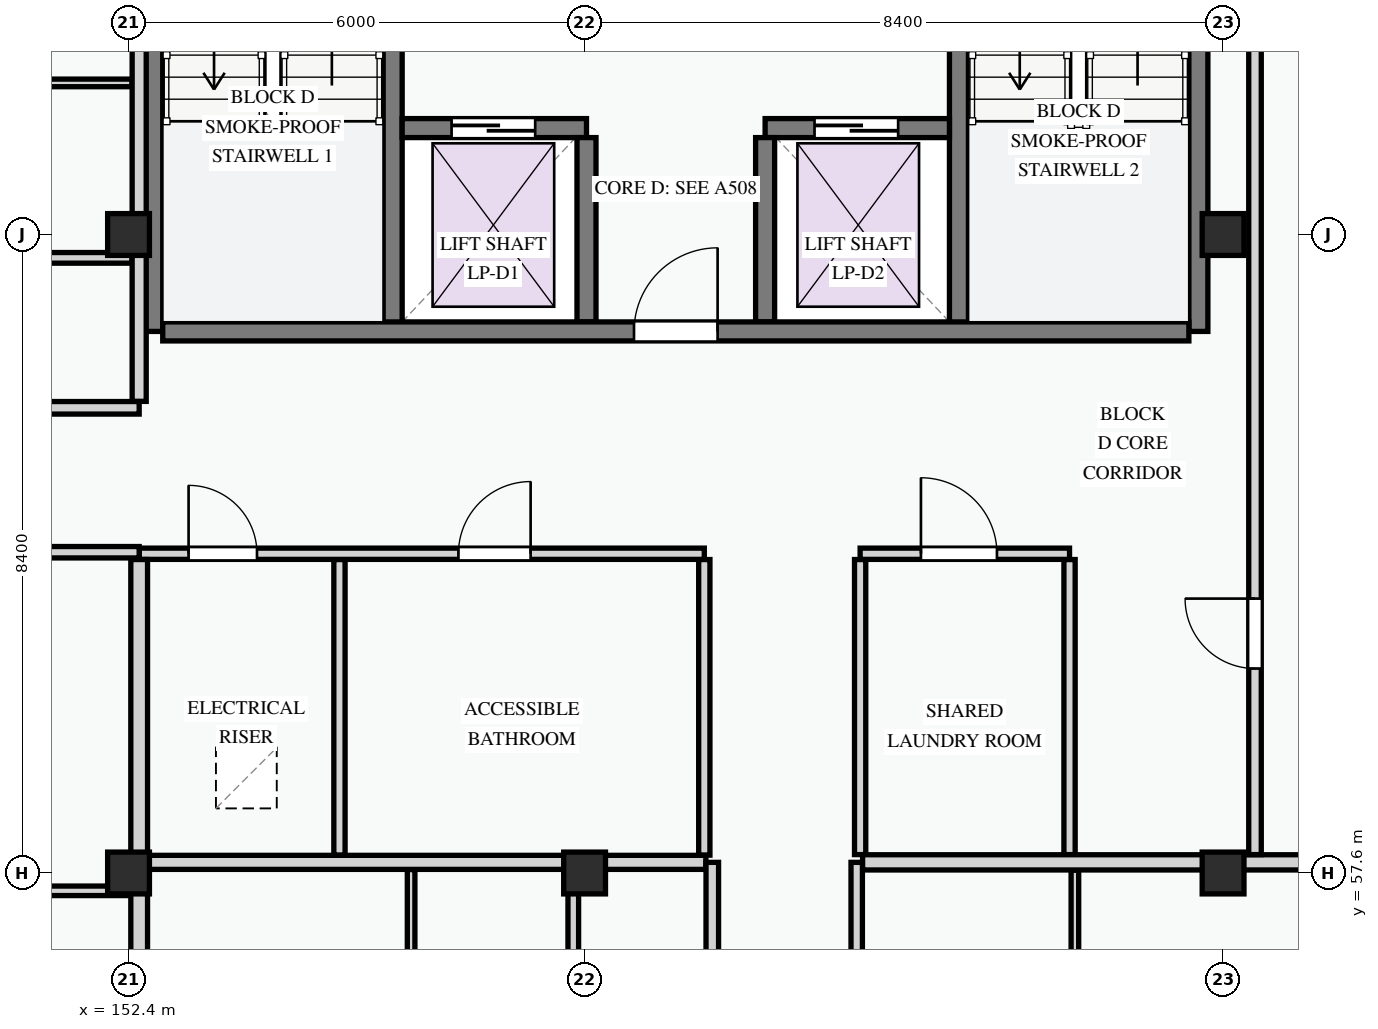
"""IFC4 building model, lengths in metres.
Left out: names, types, materials, properties, quantities, classifications, styles, units other than length and angle.
Written with IfcOpenShell. Run it as: python <this file> out.ifc"""

import sys

from ifc_helpers import new_model, si_unit, direction, frame, frame_2d, origin, origin_2d, place, context, subcontext, project, spatial, rectangle, extrude, element, fill, save


model = new_model("IFC4")
c1 = context("Model", 3, precision=1e-05, world=origin(), true_north=direction((0.0, 1.0)))
c2 = subcontext(c1, "Body", "Model", "MODEL_VIEW")
j1 = project(units=[si_unit("LENGTHUNIT", "METRE"), si_unit("PLANEANGLEUNIT", "RADIAN")], contexts=[c1])
p1 = place(None, origin())
s1 = spatial("IfcSite", under=j1, at=p1, CompositionType="ELEMENT")
p2 = place(p1, origin())
s2 = spatial("IfcBuilding", under=s1, at=p2, CompositionType="ELEMENT")
p3 = place(p2, frame((0.0, 0.0, 11.4)))
s3 = spatial("IfcBuildingStorey", under=s2, at=p3, CompositionType="ELEMENT", Elevation=11.4)
for number, where, z_axis, x_axis in (
    (1, (152.4, 57.6, 0.0), (0.0, 0.0, 1.0), (1.0, 0.0, 0.0)),
    (2, (152.4, 66.0, 0.0), (0.0, 0.0, 1.0), (1.0, 0.0, 0.0)),
    (3, (158.4, 57.6, 0.0), (0.0, 0.0, 1.0), (1.0, 0.0, 0.0)),
    (4, (166.8, 57.6, 0.0), (0.0, 0.0, 1.0), (1.0, 0.0, 0.0)),
    (5, (166.8, 66.0, 0.0), (0.0, 0.0, 1.0), (1.0, 0.0, 0.0)),
):
    element("IfcColumn", number, at=place(p3, frame(where, z_axis=z_axis, x_axis=x_axis)), inside=s3, PredefinedType="COLUMN", context=c2, shape_type="SweptSolid", body=[
        extrude(rectangle(XDim=0.55, YDim=0.55, at=origin_2d()), origin(), (0.0, 0.0, 1.0), 3.3),
    ])
p4 = place(p3, frame((155.875, 71.65, 0.0), z_axis=(0.0, 0.0, 1.0), x_axis=(0.0, -1.0, 0.0)))
e6 = element("IfcWall", 6, at=p4, inside=s3, PredefinedType="SHEAR", context=c2, shape_type="SweptSolid", body=[
    extrude(rectangle(XDim=6.925, YDim=0.25, at=frame_2d((3.462, 0.0))), origin(), (0.0, 0.0, 1.0), 3.0),
])
p5 = place(p4, frame((0.35, 0.0, 0.0)))
e7 = element("IfcOpeningElement", 7, at=p5, cuts=e6, PredefinedType="OPENING", context=c2, shape_type="SweptSolid", body=[
    extrude(rectangle(XDim=0.95, YDim=2.1, at=frame_2d((0.475, 1.05))), frame((0.0, 0.135, 0.0), z_axis=(0.0, -1.0, 0.0), x_axis=(1.0, 0.0, 0.0)), (0.0, 0.0, 1.0), 0.27),
])
p6 = place(p3, frame((152.725, 71.8, 0.0), z_axis=(0.0, 0.0, 1.0), x_axis=(0.0, -1.0, 0.0)))
e8 = element("IfcWall", 8, at=p6, inside=s3, PredefinedType="SHEAR", context=c2, shape_type="SweptSolid", body=[
    extrude(rectangle(XDim=7.075, YDim=0.25, at=frame_2d((3.538, 0.0))), origin(), (0.0, 0.0, 1.0), 3.0),
])
p7 = place(p3, frame((166.475, 71.65, 0.0), z_axis=(0.0, 0.0, 1.0), x_axis=(0.0, -1.0, 0.0)))
e9 = element("IfcWall", 9, at=p7, inside=s3, PredefinedType="SHEAR", context=c2, shape_type="SweptSolid", body=[
    extrude(rectangle(XDim=6.925, YDim=0.25, at=frame_2d((3.462, 0.0))), origin(), (0.0, 0.0, 1.0), 3.0),
])
p8 = place(p3, frame((163.325, 71.65, 0.0), z_axis=(0.0, 0.0, 1.0), x_axis=(0.0, -1.0, 0.0)))
e10 = element("IfcWall", 10, at=p8, inside=s3, PredefinedType="SHEAR", context=c2, shape_type="SweptSolid", body=[
    extrude(rectangle(XDim=6.925, YDim=0.25, at=frame_2d((3.462, 0.0))), origin(), (0.0, 0.0, 1.0), 3.0),
])
p9 = place(p8, frame((0.35, 0.0, 0.0)))
e11 = element("IfcOpeningElement", 11, at=p9, cuts=e10, PredefinedType="OPENING", context=c2, shape_type="SweptSolid", body=[
    extrude(rectangle(XDim=0.95, YDim=2.1, at=frame_2d((0.475, 1.05))), frame((0.0, 0.135, 0.0), z_axis=(0.0, -1.0, 0.0), x_axis=(1.0, 0.0, 0.0)), (0.0, 0.0, 1.0), 0.27),
])
p10 = place(p3, frame((156.0, 67.4, 0.0), z_axis=(0.0, 0.0, 1.0), x_axis=(1.0, 0.0, 0.0)))
e12 = element("IfcWall", 12, at=p10, inside=s3, PredefinedType="SHEAR", context=c2, shape_type="SweptSolid", body=[
    extrude(rectangle(XDim=2.425, YDim=0.25, at=frame_2d((1.212, 0.0))), origin(), (0.0, 0.0, 1.0), 3.0),
])
p11 = place(p10, frame((0.65, 0.0, 0.0)))
e13 = element("IfcOpeningElement", 13, at=p11, cuts=e12, PredefinedType="OPENING", context=c2, shape_type="SweptSolid", body=[
    extrude(rectangle(XDim=1.1, YDim=2.15, at=frame_2d((0.55, 1.075))), frame((0.0, 0.135, 0.0), z_axis=(0.0, -1.0, 0.0), x_axis=(1.0, 0.0, 0.0)), (0.0, 0.0, 1.0), 0.27),
])
p12 = place(p3, frame((160.775, 67.4, 0.0), z_axis=(0.0, 0.0, 1.0), x_axis=(1.0, 0.0, 0.0)))
e14 = element("IfcWall", 14, at=p12, inside=s3, PredefinedType="SHEAR", context=c2, shape_type="SweptSolid", body=[
    extrude(rectangle(XDim=2.425, YDim=0.25, at=frame_2d((1.212, 0.0))), origin(), (0.0, 0.0, 1.0), 3.0),
])
p13 = place(p12, frame((0.65, 0.0, 0.0)))
e15 = element("IfcOpeningElement", 15, at=p13, cuts=e14, PredefinedType="OPENING", context=c2, shape_type="SweptSolid", body=[
    extrude(rectangle(XDim=1.1, YDim=2.15, at=frame_2d((0.55, 1.075))), frame((0.0, 0.135, 0.0), z_axis=(0.0, -1.0, 0.0), x_axis=(1.0, 0.0, 0.0)), (0.0, 0.0, 1.0), 0.27),
])
for number, where, z_axis, x_axis in (
    (16, (158.425, 67.275, 0.0), (0.0, 0.0, 1.0), (0.0, -1.0, 0.0)),
    (17, (160.775, 67.275, 0.0), (0.0, 0.0, 1.0), (0.0, -1.0, 0.0)),
):
    element("IfcWall", number, at=place(p3, frame(where, z_axis=z_axis, x_axis=x_axis)), inside=s3, PredefinedType="SHEAR", context=c2, shape_type="SweptSolid", body=[
        extrude(rectangle(XDim=2.425, YDim=0.25, at=frame_2d((1.212, 0.0))), origin(), (0.0, 0.0, 1.0), 3.0),
    ])
p14 = place(p3, frame((152.85, 64.725, 0.0), z_axis=(0.0, 0.0, 1.0), x_axis=(1.0, 0.0, 0.0)))
e18 = element("IfcWall", 18, at=p14, inside=s3, PredefinedType="SHEAR", context=c2, shape_type="SweptSolid", body=[
    extrude(rectangle(XDim=13.5, YDim=0.25, at=frame_2d((6.75, 0.0))), origin(), (0.0, 0.0, 1.0), 3.0),
])
p15 = place(p14, frame((6.2, 0.0, 0.0)))
e19 = element("IfcOpeningElement", 19, at=p15, cuts=e18, PredefinedType="OPENING", context=c2, shape_type="SweptSolid", body=[
    extrude(rectangle(XDim=1.1, YDim=2.15, at=frame_2d((0.55, 1.075))), frame((0.0, 0.135, 0.0), z_axis=(0.0, -1.0, 0.0), x_axis=(1.0, 0.0, 0.0)), (0.0, 0.0, 1.0), 0.27),
])
for number, where, z_axis, x_axis in (
    (20, (155.175, 61.724, 0.0), (0.0, 0.0, 1.0), (0.0, -1.0, 0.0)),
    (21, (159.975, 61.724, 0.0), (0.0, 0.0, 1.0), (0.0, -1.0, 0.0)),
):
    element("IfcWall", number, at=place(p3, frame(where, z_axis=z_axis, x_axis=x_axis)), inside=s3, PredefinedType="PARTITIONING", context=c2, shape_type="SweptSolid", body=[
        extrude(rectangle(XDim=3.89, YDim=0.148, at=frame_2d((1.945, 0.0))), origin(), (0.0, 0.0, 1.0), 3.0),
    ])
for number, where, z_axis, x_axis in (
    (22, (162.025, 61.724, 0.0), (0.0, 0.0, 1.0), (0.0, -1.0, 0.0)),
    (23, (164.78, 61.724, 0.0), (0.0, 0.0, 1.0), (0.0, -1.0, 0.0)),
):
    element("IfcWall", number, at=place(p3, frame(where, z_axis=z_axis, x_axis=x_axis)), inside=s3, PredefinedType="PARTITIONING", context=c2, shape_type="SweptSolid", body=[
        extrude(rectangle(XDim=3.882, YDim=0.148, at=frame_2d((1.941, 0.0))), origin(), (0.0, 0.0, 1.0), 3.0),
    ])
p16 = place(p3, frame((152.54, 61.8, 0.0), z_axis=(0.0, 0.0, 1.0), x_axis=(1.0, 0.0, 0.0)))
e24 = element("IfcWall", 24, at=p16, inside=s3, PredefinedType="PARTITIONING", context=c2, shape_type="SweptSolid", body=[
    extrude(rectangle(XDim=7.435, YDim=0.148, at=frame_2d((3.718, 0.0))), origin(), (0.0, 0.0, 1.0), 3.0),
])
p17 = place(p16, frame((0.65, 0.0, 0.0)))
e25 = element("IfcOpeningElement", 25, at=p17, cuts=e24, PredefinedType="OPENING", context=c2, shape_type="SweptSolid", body=[
    extrude(rectangle(XDim=0.9, YDim=2.1, at=frame_2d((0.45, 1.05))), frame((0.0, 0.084, 0.0), z_axis=(0.0, -1.0, 0.0), x_axis=(1.0, 0.0, 0.0)), (0.0, 0.0, 1.0), 0.168),
])
p18 = place(p16, frame((4.2, 0.0, 0.0)))
e26 = element("IfcOpeningElement", 26, at=p18, cuts=e24, PredefinedType="OPENING", context=c2, shape_type="SweptSolid", body=[
    extrude(rectangle(XDim=0.95, YDim=2.1, at=frame_2d((0.475, 1.05))), frame((0.0, 0.084, 0.0), z_axis=(0.0, -1.0, 0.0), x_axis=(1.0, 0.0, 0.0)), (0.0, 0.0, 1.0), 0.168),
])
p19 = place(p3, frame((162.025, 61.8, 0.0), z_axis=(0.0, 0.0, 1.0), x_axis=(1.0, 0.0, 0.0)))
e27 = element("IfcWall", 27, at=p19, inside=s3, PredefinedType="PARTITIONING", context=c2, shape_type="SweptSolid", body=[
    extrude(rectangle(XDim=2.755, YDim=0.148, at=frame_2d((1.377, 0.0))), origin(), (0.0, 0.0, 1.0), 3.0),
])
p20 = place(p19, frame((0.8, 0.0, 0.0)))
e28 = element("IfcOpeningElement", 28, at=p20, cuts=e27, PredefinedType="OPENING", context=c2, shape_type="SweptSolid", body=[
    extrude(rectangle(XDim=1.0, YDim=2.15, at=frame_2d((0.5, 1.075))), frame((0.0, 0.084, 0.0), z_axis=(0.0, -1.0, 0.0), x_axis=(1.0, 0.0, 0.0)), (0.0, 0.0, 1.0), 0.168),
])
p21 = place(p3, frame((156.118, 49.939, 0.0), z_axis=(0.0, 0.0, 1.0), x_axis=(0.0, 1.0, 0.0)))
e29 = element("IfcWall", 29, at=p21, inside=s3, PredefinedType="PARTITIONING", context=c2, shape_type="SweptSolid", body=[
    extrude(rectangle(XDim=7.706, YDim=0.1, at=frame_2d((3.853, 0.0))), origin(), (0.0, 0.0, 1.0), 3.0),
])
p22 = place(p3, frame((158.251, 49.939, 0.0), z_axis=(0.0, 0.0, 1.0), x_axis=(0.0, 1.0, 0.0)))
e30 = element("IfcWall", 30, at=p22, inside=s3, PredefinedType="PARTITIONING", context=c2, shape_type="SweptSolid", body=[
    extrude(rectangle(XDim=7.706, YDim=0.14, at=frame_2d((3.853, 0.0))), origin(), (0.0, 0.0, 1.0), 2.425),
])
p23 = place(p3, frame((164.85, 49.89, 0.0), z_axis=(0.0, 0.0, 1.0), x_axis=(0.0, 1.0, 0.0)))
e31 = element("IfcWall", 31, at=p23, inside=s3, PredefinedType="PARTITIONING", context=c2, shape_type="SweptSolid", body=[
    extrude(rectangle(XDim=7.748, YDim=0.1, at=frame_2d((3.874, 0.0))), origin(), (0.0, 0.0, 1.0), 3.0),
])
p24 = place(p3, frame((152.652, 57.74, 0.0), z_axis=(0.0, 0.0, 1.0), x_axis=(1.0, 0.0, 0.0)))
e32 = element("IfcWall", 32, at=p24, inside=s3, PredefinedType="PARTITIONING", context=c2, shape_type="SweptSolid", body=[
    extrude(rectangle(XDim=7.344, YDim=0.185, at=frame_2d((3.672, 0.0))), origin(), (0.0, 0.0, 1.0), 2.375),
])
p25 = place(p3, frame((162.057, 57.74, 0.0), z_axis=(0.0, 0.0, 1.0), x_axis=(1.0, 0.0, 0.0)))
e33 = element("IfcWall", 33, at=p25, inside=s3, PredefinedType="PARTITIONING", context=c2, shape_type="SweptSolid", body=[
    extrude(rectangle(XDim=11.781, YDim=0.2, at=frame_2d((5.891, 0.0))), origin(), (0.0, 0.0, 1.0), 2.375),
])
p26 = place(p3, frame((160.08, 37.362, 0.0), z_axis=(0.0, 0.0, 1.0), x_axis=(0.0, 1.0, 0.0)))
e34 = element("IfcWall", 34, at=p26, inside=s3, PredefinedType="PARTITIONING", context=c2, shape_type="SweptSolid", body=[
    extrude(rectangle(XDim=20.378, YDim=0.165, at=frame_2d((10.189, 0.0))), origin(), (0.0, 0.0, 1.0), 3.0),
])
p27 = place(p26, frame((2.341, 0.0, 0.0)))
e35 = element("IfcOpeningElement", 35, at=p27, cuts=e34, PredefinedType="OPENING", context=c2, shape_type="SweptSolid", body=[
    extrude(rectangle(XDim=0.92, YDim=2.1, at=frame_2d((0.46, 1.05))), frame((0.0, 0.093, 0.0), z_axis=(0.0, -1.0, 0.0), x_axis=(1.0, 0.0, 0.0)), (0.0, 0.0, 1.0), 0.185),
])
p28 = place(p26, frame((9.608, 0.0, 0.0)))
e36 = element("IfcOpeningElement", 36, at=p28, cuts=e34, PredefinedType="OPENING", context=c2, shape_type="SweptSolid", body=[
    extrude(rectangle(XDim=0.92, YDim=2.1, at=frame_2d((0.46, 1.05))), frame((0.0, 0.093, 0.0), z_axis=(0.0, -1.0, 0.0), x_axis=(1.0, 0.0, 0.0)), (0.0, 0.0, 1.0), 0.185),
])
p29 = place(p3, frame((161.98, 37.362, 0.0), z_axis=(0.0, 0.0, 1.0), x_axis=(0.0, 1.0, 0.0)))
e37 = element("IfcWall", 37, at=p29, inside=s3, PredefinedType="PARTITIONING", context=c2, shape_type="SweptSolid", body=[
    extrude(rectangle(XDim=20.378, YDim=0.15, at=frame_2d((10.189, 0.0))), origin(), (0.0, 0.0, 1.0), 3.0),
])
p30 = place(p29, frame((2.342, 0.0, 0.0)))
e38 = element("IfcOpeningElement", 38, at=p30, cuts=e37, PredefinedType="OPENING", context=c2, shape_type="SweptSolid", body=[
    extrude(rectangle(XDim=0.92, YDim=2.1, at=frame_2d((0.46, 1.05))), frame((0.0, 0.085, 0.0), z_axis=(0.0, -1.0, 0.0), x_axis=(1.0, 0.0, 0.0)), (0.0, 0.0, 1.0), 0.17),
])
p31 = place(p29, frame((9.581, 0.0, 0.0)))
e39 = element("IfcOpeningElement", 39, at=p31, cuts=e37, PredefinedType="OPENING", context=c2, shape_type="SweptSolid", body=[
    extrude(rectangle(XDim=0.96, YDim=2.12, at=frame_2d((0.48, 1.06))), frame((0.0, 0.085, 0.0), z_axis=(0.0, -1.0, 0.0), x_axis=(1.0, 0.0, 0.0)), (0.0, 0.0, 1.0), 0.17),
])
p32 = place(p3, frame((167.22, 57.842, 0.0), z_axis=(0.0, 0.0, 1.0), x_axis=(0.0, 1.0, 0.0)))
e40 = element("IfcWall", 40, at=p32, inside=s3, PredefinedType="PARTITIONING", context=c2, shape_type="SweptSolid", body=[
    extrude(rectangle(XDim=14.018, YDim=0.165, at=frame_2d((7.009, 0.0))), origin(), (0.0, 0.0, 1.0), 2.425),
])
p33 = place(p32, frame((2.448, 0.0, 0.0)))
e41 = element("IfcOpeningElement", 41, at=p33, cuts=e40, PredefinedType="OPENING", context=c2, shape_type="SweptSolid", body=[
    extrude(rectangle(XDim=0.92, YDim=2.1, at=frame_2d((0.46, 1.05))), frame((0.0, 0.093, 0.0), z_axis=(0.0, -1.0, 0.0), x_axis=(1.0, 0.0, 0.0)), (0.0, 0.0, 1.0), 0.185),
])
p34 = place(p3, frame((145.852, 57.365, 0.0), z_axis=(0.0, 0.0, 1.0), x_axis=(1.0, 0.0, 0.0)))
e42 = element("IfcWall", 42, at=p34, inside=s3, PredefinedType="PARTITIONING", context=c2, shape_type="SweptSolid", body=[
    extrude(rectangle(XDim=6.576, YDim=0.125, at=frame_2d((3.288, 0.0))), origin(), (0.0, 0.0, 1.0), 2.375),
])
p35 = place(p3, frame((145.87, 67.994, 0.0), z_axis=(0.0, 0.0, 1.0), x_axis=(1.0, 0.0, 0.0)))
e43 = element("IfcWall", 43, at=p35, inside=s3, PredefinedType="PARTITIONING", context=c2, shape_type="SweptSolid", body=[
    extrude(rectangle(XDim=6.576, YDim=0.1, at=frame_2d((3.288, 0.0))), origin(), (0.0, 0.0, 1.0), 3.0),
])
p36 = place(p3, frame((145.87, 65.693, 0.0), z_axis=(0.0, 0.0, 1.0), x_axis=(1.0, 0.0, 0.0)))
e44 = element("IfcWall", 44, at=p36, inside=s3, PredefinedType="PARTITIONING", context=c2, shape_type="SweptSolid", body=[
    extrude(rectangle(XDim=6.576, YDim=0.14, at=frame_2d((3.288, 0.0))), origin(), (0.0, 0.0, 1.0), 2.375),
])
p37 = place(p3, frame((152.54, 43.26, 0.0), z_axis=(0.0, 0.0, 1.0), x_axis=(0.0, 1.0, 0.0)))
e45 = element("IfcWall", 45, at=p37, inside=s3, PredefinedType="PARTITIONING", context=c2, shape_type="SweptSolid", body=[
    extrude(rectangle(XDim=18.464, YDim=0.22, at=frame_2d((9.232, 0.0))), origin(), (0.0, 0.0, 1.0), 2.425),
])
p38 = place(p3, frame((152.54, 63.804, 0.0), z_axis=(0.0, 0.0, 1.0), x_axis=(0.0, 1.0, 0.0)))
e46 = element("IfcWall", 46, at=p38, inside=s3, PredefinedType="PARTITIONING", context=c2, shape_type="SweptSolid", body=[
    extrude(rectangle(XDim=8.033, YDim=0.185, at=frame_2d((4.017, 0.0))), origin(), (0.0, 0.0, 1.0), 2.425),
])
p39 = place(p3, frame((138.06, 61.82, 0.0), z_axis=(0.0, 0.0, 1.0), x_axis=(1.0, 0.0, 0.0)))
e47 = element("IfcWall", 47, at=p39, inside=s3, PredefinedType="PARTITIONING", context=c2, shape_type="SweptSolid", body=[
    extrude(rectangle(XDim=14.48, YDim=0.15, at=frame_2d((7.24, 0.0))), origin(), (0.0, 0.0, 1.0), 3.0),
])
p40 = place(p39, frame((2.409, 0.0, 0.0)))
e48 = element("IfcOpeningElement", 48, at=p40, cuts=e47, PredefinedType="OPENING", context=c2, shape_type="SweptSolid", body=[
    extrude(rectangle(XDim=0.92, YDim=2.1, at=frame_2d((0.46, 1.05))), frame((0.0, 0.085, 0.0), z_axis=(0.0, -1.0, 0.0), x_axis=(1.0, 0.0, 0.0)), (0.0, 0.0, 1.0), 0.17),
])
p41 = place(p3, frame((138.06, 63.72, 0.0), z_axis=(0.0, 0.0, 1.0), x_axis=(1.0, 0.0, 0.0)))
e49 = element("IfcWall", 49, at=p41, inside=s3, PredefinedType="PARTITIONING", context=c2, shape_type="SweptSolid", body=[
    extrude(rectangle(XDim=14.48, YDim=0.165, at=frame_2d((7.24, 0.0))), origin(), (0.0, 0.0, 1.0), 3.0),
])
p42 = place(p41, frame((2.412, 0.0, 0.0)))
e50 = element("IfcOpeningElement", 50, at=p42, cuts=e49, PredefinedType="OPENING", context=c2, shape_type="SweptSolid", body=[
    extrude(rectangle(XDim=0.92, YDim=2.1, at=frame_2d((0.46, 1.05))), frame((0.0, 0.093, 0.0), z_axis=(0.0, -1.0, 0.0), x_axis=(1.0, 0.0, 0.0)), (0.0, 0.0, 1.0), 0.185),
])
p43 = place(p11, origin())
e51 = element("IfcDoor", 51, at=p43, inside=s3, OperationType="SLIDING_TO_LEFT", PredefinedType="DOOR", context=c2, shape_type="SweptSolid", body=[
    extrude(rectangle(XDim=1.1, YDim=2.15, at=frame_2d((0.55, 1.075))), frame((0.0, 0.025, 0.0), z_axis=(0.0, -1.0, 0.0), x_axis=(1.0, 0.0, 0.0)), (0.0, 0.0, 1.0), 0.05),
])
fill(e13, e51)
p44 = place(p13, origin())
e52 = element("IfcDoor", 52, at=p44, inside=s3, OperationType="SLIDING_TO_LEFT", PredefinedType="DOOR", context=c2, shape_type="SweptSolid", body=[
    extrude(rectangle(XDim=1.1, YDim=2.15, at=frame_2d((0.55, 1.075))), frame((0.0, 0.025, 0.0), z_axis=(0.0, -1.0, 0.0), x_axis=(1.0, 0.0, 0.0)), (0.0, 0.0, 1.0), 0.05),
])
fill(e15, e52)
p45 = place(p15, origin())
e53 = element("IfcDoor", 53, at=p45, inside=s3, OperationType="SINGLE_SWING_RIGHT", PredefinedType="DOOR", context=c2, shape_type="SweptSolid", body=[
    extrude(rectangle(XDim=1.1, YDim=2.15, at=frame_2d((0.55, 1.075))), frame((0.0, 0.025, 0.0), z_axis=(0.0, -1.0, 0.0), x_axis=(1.0, 0.0, 0.0)), (0.0, 0.0, 1.0), 0.05),
])
fill(e19, e53)
p46 = place(p17, origin())
e54 = element("IfcDoor", 54, at=p46, inside=s3, OperationType="SINGLE_SWING_LEFT", PredefinedType="DOOR", context=c2, shape_type="SweptSolid", body=[
    extrude(rectangle(XDim=0.9, YDim=2.1, at=frame_2d((0.45, 1.05))), frame((0.0, 0.025, 0.0), z_axis=(0.0, -1.0, 0.0), x_axis=(1.0, 0.0, 0.0)), (0.0, 0.0, 1.0), 0.05),
])
fill(e25, e54)
p47 = place(p18, origin())
e55 = element("IfcDoor", 55, at=p47, inside=s3, OperationType="SINGLE_SWING_RIGHT", PredefinedType="DOOR", context=c2, shape_type="SweptSolid", body=[
    extrude(rectangle(XDim=0.95, YDim=2.1, at=frame_2d((0.475, 1.05))), frame((0.0, 0.025, 0.0), z_axis=(0.0, -1.0, 0.0), x_axis=(1.0, 0.0, 0.0)), (0.0, 0.0, 1.0), 0.05),
])
fill(e26, e55)
p48 = place(p20, origin())
e56 = element("IfcDoor", 56, at=p48, inside=s3, OperationType="SINGLE_SWING_LEFT", PredefinedType="DOOR", context=c2, shape_type="SweptSolid", body=[
    extrude(rectangle(XDim=1.0, YDim=2.15, at=frame_2d((0.5, 1.075))), frame((0.0, 0.025, 0.0), z_axis=(0.0, -1.0, 0.0), x_axis=(1.0, 0.0, 0.0)), (0.0, 0.0, 1.0), 0.05),
])
fill(e28, e56)
p49 = place(p33, origin())
e57 = element("IfcDoor", 57, at=p49, inside=s3, OperationType="SINGLE_SWING_RIGHT", PredefinedType="DOOR", context=c2, shape_type="SweptSolid", body=[
    extrude(rectangle(XDim=0.92, YDim=2.1, at=frame_2d((0.46, 1.05))), frame((0.0, 0.025, 0.0), z_axis=(0.0, -1.0, 0.0), x_axis=(1.0, 0.0, 0.0)), (0.0, 0.0, 1.0), 0.05),
])
fill(e41, e57)
save(model, sys.argv[1])
